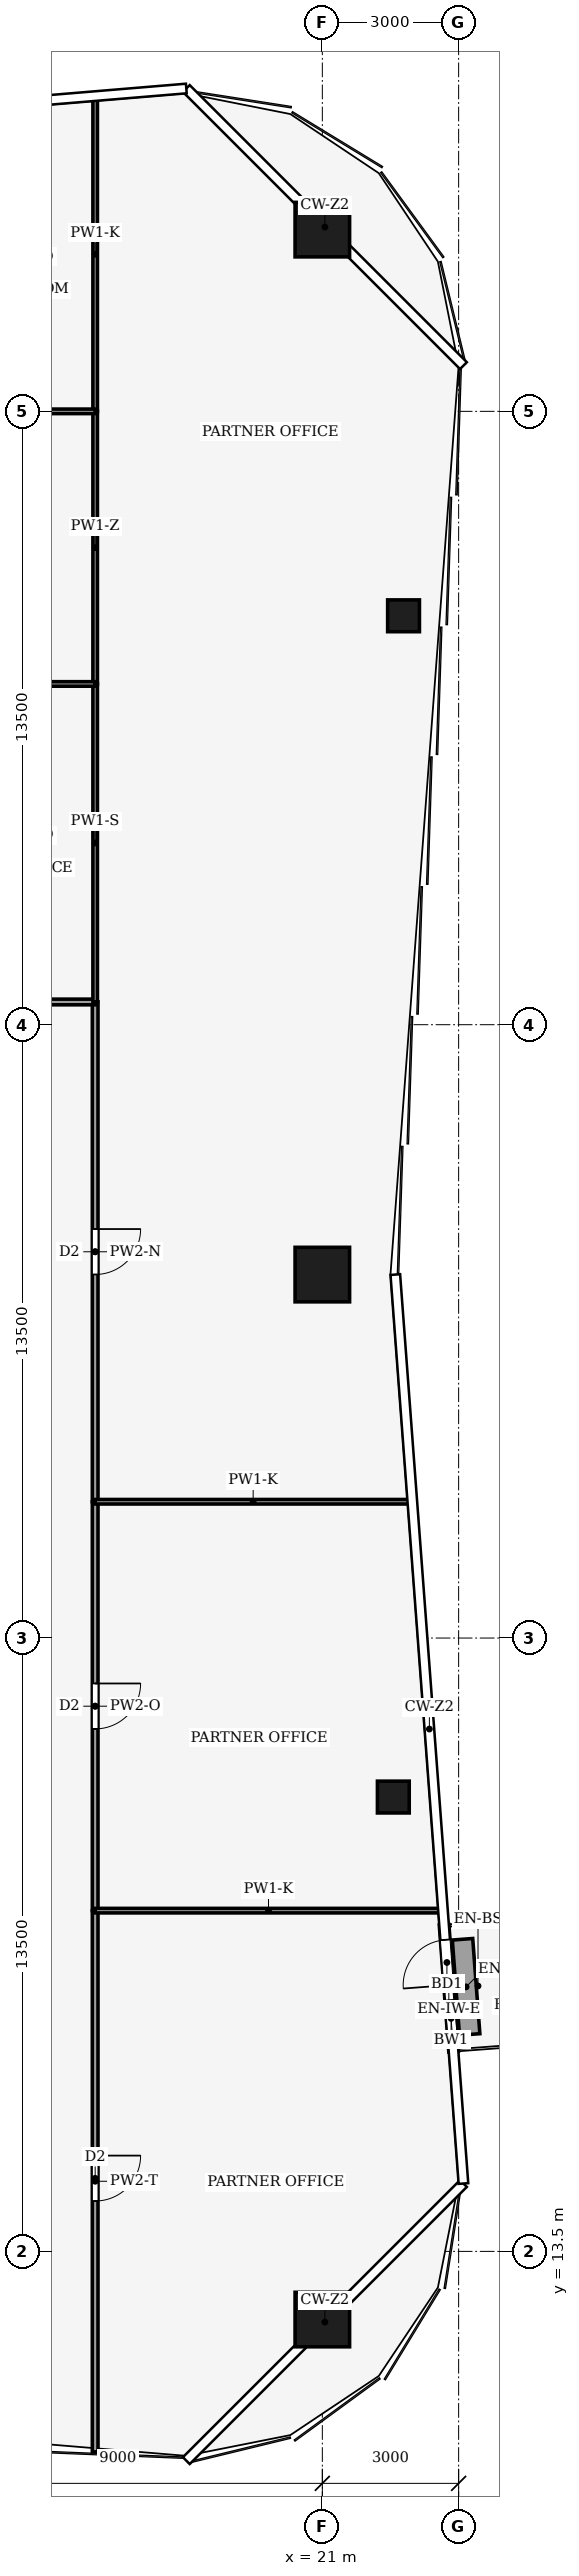
"""IFC4 building model, lengths in metres.
Left out: names, types, materials, properties, quantities, classifications, styles, units other than length and angle.
Written with IfcOpenShell. Run it as: python <this file> out.ifc"""

import sys

from ifc_helpers import new_model, si_unit, direction, frame, frame_2d, origin, origin_2d, place, context, subcontext, project, spatial, rectangle, hollow_rectangle, extrude, element, fill, save


model = new_model("IFC4")
c1 = context("Model", 3, precision=1e-05, world=origin(), true_north=direction((0.0, 1.0)))
c2 = subcontext(c1, "Body", "Model", "MODEL_VIEW")
j1 = project(units=[si_unit("LENGTHUNIT", "METRE"), si_unit("PLANEANGLEUNIT", "RADIAN")], contexts=[c1])
p1 = place(None, origin())
s1 = spatial("IfcSite", under=j1, at=p1, CompositionType="ELEMENT")
p2 = place(p1, origin())
s2 = spatial("IfcBuilding", under=s1, at=p2, CompositionType="ELEMENT")
p3 = place(p2, frame((0.0, 0.0, 166.0)))
s3 = spatial("IfcBuildingStorey", under=s2, at=p3, CompositionType="ELEMENT", Elevation=166.0)
for number, where, z_axis, x_axis in (
    (1, (21.0, 58.0, 0.0), (0.0, 0.0, 1.0), (1.0, 0.0, 0.0)),
    (2, (21.0, 35.0, 0.0), (0.0, 0.0, 1.0), (1.0, 0.0, 0.0)),
    (3, (21.0, 12.0, 0.0), (0.0, 0.0, 1.0), (1.0, 0.0, 0.0)),
):
    element("IfcColumn", number, at=place(p3, frame(where, z_axis=z_axis, x_axis=x_axis)), inside=s3, PredefinedType="COLUMN", context=c2, shape_type="SweptSolid", body=[
        extrude(hollow_rectangle(XDim=1.2, YDim=1.2, WallThickness=0.07, at=origin_2d()), origin(), (0.0, 0.0, 1.0), 4.0),
    ])
for number, where, z_axis, x_axis in (
    (4, (22.562, 23.5, 0.0), (0.0, 0.0, 1.0), (1.0, 0.0, 0.0)),
    (5, (22.788, 49.5, 0.0), (0.0, 0.0, 1.0), (1.0, 0.0, 0.0)),
):
    element("IfcColumn", number, at=place(p3, frame(where, z_axis=z_axis, x_axis=x_axis)), inside=s3, PredefinedType="COLUMN", context=c2, shape_type="SweptSolid", body=[
        extrude(hollow_rectangle(XDim=0.7, YDim=0.7, WallThickness=0.03, at=origin_2d()), origin(), (0.0, 0.0, 1.0), 4.0),
    ])
p4 = place(p3, frame((23.889, 17.897, 0.0), z_axis=(0.0, 0.0, 1.0), x_axis=(-0.07478344779, 0.997199797401, 0.0)))
e6 = element("IfcWall", 6, at=p4, inside=s3, PredefinedType="SOLIDWALL", context=c2, shape_type="SweptSolid", body=[
    extrude(rectangle(XDim=2.801, YDim=0.212, at=frame_2d((1.4, 0.0))), origin(), (0.0, 0.0, 1.0), 3.65),
])
p5 = place(p4, frame((1.467, 0.0, 0.0)))
e7 = element("IfcOpeningElement", 7, at=p5, cuts=e6, PredefinedType="OPENING", context=c2, shape_type="SweptSolid", body=[
    extrude(rectangle(XDim=1.0, YDim=2.1, at=frame_2d((0.5, 1.05))), frame((0.0, 0.116, 0.0), z_axis=(0.0, -1.0, 0.0), x_axis=(1.0, 0.0, 0.0)), (0.0, 0.0, 1.0), 0.232),
])
p6 = place(p4, frame((0.334, 0.0, 0.9)))
e8 = element("IfcOpeningElement", 8, at=p6, cuts=e6, PredefinedType="OPENING", context=c2, shape_type="SweptSolid", body=[
    extrude(rectangle(XDim=0.8, YDim=1.2, at=frame_2d((0.4, 0.6))), frame((0.0, 0.116, 0.0), z_axis=(0.0, -1.0, 0.0), x_axis=(1.0, 0.0, 0.0)), (0.0, 0.0, 1.0), 0.232),
])
p7 = place(p3, frame((24.243, 18.274, 0.0), z_axis=(0.0, 0.0, 1.0), x_axis=(-0.074706185882, 0.997205588528, 0.0)))
e9 = element("IfcWall", 9, at=p7, inside=s3, PredefinedType="USERDEFINED", context=c2, shape_type="SweptSolid", body=[
    extrude(rectangle(XDim=2.101, YDim=0.45, at=frame_2d((1.051, 0.0))), origin(), (0.0, 0.0, 1.0), 0.4),
])
p8 = place(p3, frame((16.0, 21.0, 0.0), z_axis=(0.0, 0.0, 1.0), x_axis=(0.0, -1.0, 0.0)))
e10 = element("IfcWall", 10, at=p8, inside=s3, PredefinedType="PARTITIONING", context=c2, shape_type="SweptSolid", body=[
    extrude(rectangle(XDim=11.913, YDim=0.125, at=frame_2d((5.957, 0.0))), origin(), (0.0, 0.0, 1.0), 2.92),
])
p9 = place(p8, frame((5.392, 0.0, 0.0)))
e11 = element("IfcOpeningElement", 11, at=p9, cuts=e10, PredefinedType="OPENING", context=c2, shape_type="SweptSolid", body=[
    extrude(rectangle(XDim=1.0, YDim=2.1, at=frame_2d((0.5, 1.05))), frame((0.0, 0.073, 0.0), z_axis=(0.0, -1.0, 0.0), x_axis=(1.0, 0.0, 0.0)), (0.0, 0.0, 1.0), 0.145),
])
p10 = place(p3, frame((16.0, 30.0, 0.0), z_axis=(0.0, 0.0, 1.0), x_axis=(0.0, -1.0, 0.0)))
e12 = element("IfcWall", 12, at=p10, inside=s3, PredefinedType="PARTITIONING", context=c2, shape_type="SweptSolid", body=[
    extrude(rectangle(XDim=9.0, YDim=0.125, at=frame_2d((4.5, 0.0))), origin(), (0.0, 0.0, 1.0), 3.36),
])
p11 = place(p10, frame((4.0, 0.0, 0.0)))
e13 = element("IfcOpeningElement", 13, at=p11, cuts=e12, PredefinedType="OPENING", context=c2, shape_type="SweptSolid", body=[
    extrude(rectangle(XDim=1.0, YDim=2.1, at=frame_2d((0.5, 1.05))), frame((0.0, 0.073, 0.0), z_axis=(0.0, -1.0, 0.0), x_axis=(1.0, 0.0, 0.0)), (0.0, 0.0, 1.0), 0.145),
])
p12 = place(p3, frame((16.0, 41.004, 0.0), z_axis=(0.0, 0.0, 1.0), x_axis=(0.0, -1.0, 0.0)))
e14 = element("IfcWall", 14, at=p12, inside=s3, PredefinedType="PARTITIONING", context=c2, shape_type="SweptSolid", body=[
    extrude(rectangle(XDim=11.004, YDim=0.125, at=frame_2d((5.502, 0.0))), origin(), (0.0, 0.0, 1.0), 3.02),
])
p13 = place(p12, frame((5.002, 0.0, 0.0)))
e15 = element("IfcOpeningElement", 15, at=p13, cuts=e14, PredefinedType="OPENING", context=c2, shape_type="SweptSolid", body=[
    extrude(rectangle(XDim=1.0, YDim=2.1, at=frame_2d((0.5, 1.05))), frame((0.0, 0.073, 0.0), z_axis=(0.0, -1.0, 0.0), x_axis=(1.0, 0.0, 0.0)), (0.0, 0.0, 1.0), 0.145),
])
p14 = place(p3, frame((12.0, 41.0, 0.0), z_axis=(0.0, 0.0, 1.0), x_axis=(1.0, 0.0, 0.0)))
e16 = element("IfcWall", 16, at=p14, inside=s3, PredefinedType="PARTITIONING", context=c2, shape_type="SweptSolid", body=[
    extrude(rectangle(XDim=4.0, YDim=0.125, at=frame_2d((2.0, 0.0))), origin(), (0.0, 0.0, 1.0), 3.32),
])
p15 = place(p14, frame((1.5, 0.0, 0.0)))
e17 = element("IfcOpeningElement", 17, at=p15, cuts=e16, PredefinedType="OPENING", context=c2, shape_type="SweptSolid", body=[
    extrude(rectangle(XDim=1.0, YDim=2.1, at=frame_2d((0.5, 1.05))), frame((0.0, 0.073, 0.0), z_axis=(0.0, -1.0, 0.0), x_axis=(1.0, 0.0, 0.0)), (0.0, 0.0, 1.0), 0.145),
])
p16 = place(p3, frame((23.63, 21.0, 0.0), z_axis=(0.0, 0.0, 1.0), x_axis=(-1.0, 0.0, 0.0)))
e18 = element("IfcWall", 18, at=p16, inside=s3, PredefinedType="PARTITIONING", context=c2, shape_type="SweptSolid", body=[
    extrude(rectangle(XDim=7.63, YDim=0.1, at=frame_2d((3.815, 0.0))), origin(), (0.0, 0.0, 1.0), 2.92),
])
p17 = place(p3, frame((22.955, 30.0, 0.0), z_axis=(0.0, 0.0, 1.0), x_axis=(-1.0, 0.0, 0.0)))
e19 = element("IfcWall", 19, at=p17, inside=s3, PredefinedType="PARTITIONING", context=c2, shape_type="SweptSolid", body=[
    extrude(rectangle(XDim=6.955, YDim=0.1, at=frame_2d((3.478, 0.0))), origin(), (0.0, 0.0, 1.0), 2.92),
])
p18 = place(p3, frame((16.0, 48.0, 0.0), z_axis=(0.0, 0.0, 1.0), x_axis=(0.0, -1.0, 0.0)))
e20 = element("IfcWall", 20, at=p18, inside=s3, PredefinedType="PARTITIONING", context=c2, shape_type="SweptSolid", body=[
    extrude(rectangle(XDim=7.0, YDim=0.1, at=frame_2d((3.5, 0.0))), origin(), (0.0, 0.0, 1.0), 3.32),
])
p19 = place(p3, frame((16.0, 54.0, 0.0), z_axis=(0.0, 0.0, 1.0), x_axis=(0.0, -1.0, 0.0)))
e21 = element("IfcWall", 21, at=p19, inside=s3, PredefinedType="PARTITIONING", context=c2, shape_type="SweptSolid", body=[
    extrude(rectangle(XDim=6.0, YDim=0.1, at=frame_2d((3.0, 0.0))), origin(), (0.0, 0.0, 1.0), 3.12),
])
p20 = place(p3, frame((16.0, 60.913, 0.0), z_axis=(0.0, 0.0, 1.0), x_axis=(0.0, -1.0, 0.0)))
e22 = element("IfcWall", 22, at=p20, inside=s3, PredefinedType="PARTITIONING", context=c2, shape_type="SweptSolid", body=[
    extrude(rectangle(XDim=6.913, YDim=0.1, at=frame_2d((3.457, 0.0))), origin(), (0.0, 0.0, 1.0), 2.92),
])
p21 = place(p3, frame((16.0, 48.0, 0.0), z_axis=(0.0, 0.0, 1.0), x_axis=(-1.0, 0.0, 0.0)))
e23 = element("IfcWall", 23, at=p21, inside=s3, PredefinedType="PARTITIONING", context=c2, shape_type="SweptSolid", body=[
    extrude(rectangle(XDim=4.004, YDim=0.1, at=frame_2d((2.002, 0.0))), origin(), (0.0, 0.0, 1.0), 3.75),
])
p22 = place(p3, frame((12.0, 54.0, 0.0), z_axis=(0.0, 0.0, 1.0), x_axis=(1.0, 0.0, 0.0)))
e24 = element("IfcWall", 24, at=p22, inside=s3, PredefinedType="PARTITIONING", context=c2, shape_type="SweptSolid", body=[
    extrude(rectangle(XDim=4.0, YDim=0.1, at=frame_2d((2.0, 0.0))), origin(), (0.0, 0.0, 1.0), 3.75),
])
p23 = place(p22, frame((1.5, 0.0, 0.0)))
e25 = element("IfcOpeningElement", 25, at=p23, cuts=e24, PredefinedType="OPENING", context=c2, shape_type="SweptSolid", body=[
    extrude(rectangle(XDim=1.0, YDim=2.1, at=frame_2d((0.5, 1.05))), frame((0.0, 0.06, 0.0), z_axis=(0.0, -1.0, 0.0), x_axis=(1.0, 0.0, 0.0)), (0.0, 0.0, 1.0), 0.12),
])
p24 = place(p5, origin())
e26 = element("IfcDoor", 26, at=p24, inside=s3, OperationType="SINGLE_SWING_RIGHT", PredefinedType="DOOR", context=c2, shape_type="SweptSolid", body=[
    extrude(rectangle(XDim=1.0, YDim=2.1, at=frame_2d((0.5, 1.05))), frame((0.0, 0.025, 0.0), z_axis=(0.0, -1.0, 0.0), x_axis=(1.0, 0.0, 0.0)), (0.0, 0.0, 1.0), 0.05),
])
fill(e7, e26)
p25 = place(p6, origin())
e27 = element("IfcWindow", 27, at=p25, inside=s3, PartitioningType="SINGLE_PANEL", PredefinedType="WINDOW", context=c2, shape_type="SweptSolid", body=[
    extrude(rectangle(XDim=0.8, YDim=1.2, at=frame_2d((0.4, 0.6))), frame((0.0, 0.03, 0.0), z_axis=(0.0, -1.0, 0.0), x_axis=(1.0, 0.0, 0.0)), (0.0, 0.0, 1.0), 0.06),
])
fill(e8, e27)
p26 = place(p9, origin())
e28 = element("IfcDoor", 28, at=p26, inside=s3, OperationType="SINGLE_SWING_LEFT", PredefinedType="DOOR", context=c2, shape_type="SweptSolid", body=[
    extrude(rectangle(XDim=1.0, YDim=2.1, at=frame_2d((0.5, 1.05))), frame((0.0, 0.025, 0.0), z_axis=(0.0, -1.0, 0.0), x_axis=(1.0, 0.0, 0.0)), (0.0, 0.0, 1.0), 0.05),
])
fill(e11, e28)
p27 = place(p11, origin())
e29 = element("IfcDoor", 29, at=p27, inside=s3, OperationType="SINGLE_SWING_LEFT", PredefinedType="DOOR", context=c2, shape_type="SweptSolid", body=[
    extrude(rectangle(XDim=1.0, YDim=2.1, at=frame_2d((0.5, 1.05))), frame((0.0, 0.025, 0.0), z_axis=(0.0, -1.0, 0.0), x_axis=(1.0, 0.0, 0.0)), (0.0, 0.0, 1.0), 0.05),
])
fill(e13, e29)
p28 = place(p13, origin())
e30 = element("IfcDoor", 30, at=p28, inside=s3, OperationType="SINGLE_SWING_RIGHT", PredefinedType="DOOR", context=c2, shape_type="SweptSolid", body=[
    extrude(rectangle(XDim=1.0, YDim=2.1, at=frame_2d((0.5, 1.05))), frame((0.0, 0.025, 0.0), z_axis=(0.0, -1.0, 0.0), x_axis=(1.0, 0.0, 0.0)), (0.0, 0.0, 1.0), 0.05),
])
fill(e15, e30)
save(model, sys.argv[1])
